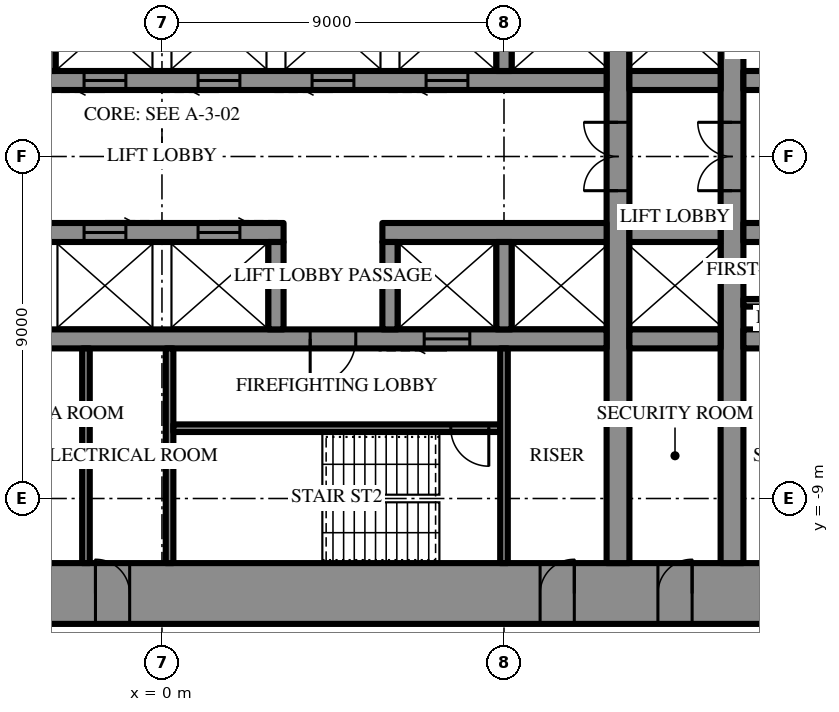
"""IFC4 building model, lengths in metres.
Left out: names, types, materials, properties, quantities, classifications, styles, units other than length and angle.
Written with IfcOpenShell. Run it as: python <this file> out.ifc"""

import sys

from ifc_helpers import new_model, si_unit, direction, frame, frame_2d, origin, place, context, subcontext, project, spatial, rectangle, extrude, element, fill, save


model = new_model("IFC4")
c1 = context("Model", 3, precision=1e-05, world=origin(), true_north=direction((0.0, 1.0)))
c2 = subcontext(c1, "Body", "Model", "MODEL_VIEW")
j1 = project(units=[si_unit("LENGTHUNIT", "METRE"), si_unit("PLANEANGLEUNIT", "RADIAN")], contexts=[c1])
p1 = place(None, origin())
s1 = spatial("IfcSite", under=j1, at=p1, CompositionType="ELEMENT")
p2 = place(p1, origin())
s2 = spatial("IfcBuilding", under=s1, at=p2, CompositionType="ELEMENT")
p3 = place(p2, frame((0.0, 0.0, 127.9)))
s3 = spatial("IfcBuildingStorey", under=s2, at=p3, CompositionType="ELEMENT", Elevation=127.9)
p4 = place(p3, frame((18.6, -11.5, 0.0), z_axis=(0.0, 0.0, 1.0), x_axis=(-1.0, 0.0, 0.0)))
e1 = element("IfcWall", 1, at=p4, inside=s3, PredefinedType="SHEAR", context=c2, shape_type="SweptSolid", body=[
    extrude(rectangle(XDim=37.2, YDim=1.6, at=frame_2d((18.6, 0.0))), origin(), (0.0, 0.0, 1.0), 4.2),
])
p5 = place(p4, frame((19.45, 0.0, 0.0)))
e2 = element("IfcOpeningElement", 2, at=p5, cuts=e1, PredefinedType="OPENING", context=c2, shape_type="SweptSolid", body=[
    extrude(rectangle(XDim=0.9, YDim=2.2, at=frame_2d((0.45, 1.1))), frame((0.0, 0.81, 0.0), z_axis=(0.0, -1.0, 0.0), x_axis=(1.0, 0.0, 0.0)), (0.0, 0.0, 1.0), 1.62),
])
p6 = place(p4, frame((22.45, 0.0, 0.0)))
e3 = element("IfcOpeningElement", 3, at=p6, cuts=e1, PredefinedType="OPENING", context=c2, shape_type="SweptSolid", body=[
    extrude(rectangle(XDim=0.9, YDim=2.2, at=frame_2d((0.45, 1.1))), frame((0.0, 0.81, 0.0), z_axis=(0.0, -1.0, 0.0), x_axis=(1.0, 0.0, 0.0)), (0.0, 0.0, 1.0), 1.62),
])
p7 = place(p4, frame((25.5, 0.0, 0.0)))
e4 = element("IfcOpeningElement", 4, at=p7, cuts=e1, PredefinedType="OPENING", context=c2, shape_type="SweptSolid", body=[
    extrude(rectangle(XDim=1.0, YDim=2.2, at=frame_2d((0.5, 1.1))), frame((0.0, 0.81, 0.0), z_axis=(0.0, -1.0, 0.0), x_axis=(1.0, 0.0, 0.0)), (0.0, 0.0, 1.0), 1.62),
])
p8 = place(p4, frame((1.8, 0.0, 0.0)))
e5 = element("IfcOpeningElement", 5, at=p8, cuts=e1, PredefinedType="OPENING", context=c2, shape_type="SweptSolid", body=[
    extrude(rectangle(XDim=0.9, YDim=2.2, at=frame_2d((0.45, 1.1))), frame((0.0, 0.81, 0.0), z_axis=(0.0, -1.0, 0.0), x_axis=(1.0, 0.0, 0.0)), (0.0, 0.0, 1.0), 1.62),
])
p9 = place(p4, frame((4.65, 0.0, 0.0)))
e6 = element("IfcOpeningElement", 6, at=p9, cuts=e1, PredefinedType="OPENING", context=c2, shape_type="SweptSolid", body=[
    extrude(rectangle(XDim=0.9, YDim=2.2, at=frame_2d((0.45, 1.1))), frame((0.0, 0.81, 0.0), z_axis=(0.0, -1.0, 0.0), x_axis=(1.0, 0.0, 0.0)), (0.0, 0.0, 1.0), 1.62),
])
p10 = place(p4, frame((7.75, 0.0, 0.0)))
e7 = element("IfcOpeningElement", 7, at=p10, cuts=e1, PredefinedType="OPENING", context=c2, shape_type="SweptSolid", body=[
    extrude(rectangle(XDim=0.9, YDim=2.2, at=frame_2d((0.45, 1.1))), frame((0.0, 0.81, 0.0), z_axis=(0.0, -1.0, 0.0), x_axis=(1.0, 0.0, 0.0)), (0.0, 0.0, 1.0), 1.62),
])
p11 = place(p4, frame((28.55, 0.0, 0.0)))
e8 = element("IfcOpeningElement", 8, at=p11, cuts=e1, PredefinedType="OPENING", context=c2, shape_type="SweptSolid", body=[
    extrude(rectangle(XDim=0.9, YDim=2.2, at=frame_2d((0.45, 1.1))), frame((0.0, 0.81, 0.0), z_axis=(0.0, -1.0, 0.0), x_axis=(1.0, 0.0, 0.0)), (0.0, 0.0, 1.0), 1.62),
])
p12 = place(p4, frame((31.65, 0.0, 0.0)))
e9 = element("IfcOpeningElement", 9, at=p12, cuts=e1, PredefinedType="OPENING", context=c2, shape_type="SweptSolid", body=[
    extrude(rectangle(XDim=0.9, YDim=2.2, at=frame_2d((0.45, 1.1))), frame((0.0, 0.81, 0.0), z_axis=(0.0, -1.0, 0.0), x_axis=(1.0, 0.0, 0.0)), (0.0, 0.0, 1.0), 1.62),
])
p13 = place(p4, frame((34.5, 0.0, 0.0)))
e10 = element("IfcOpeningElement", 10, at=p13, cuts=e1, PredefinedType="OPENING", context=c2, shape_type="SweptSolid", body=[
    extrude(rectangle(XDim=0.9, YDim=2.2, at=frame_2d((0.45, 1.1))), frame((0.0, 0.81, 0.0), z_axis=(0.0, -1.0, 0.0), x_axis=(1.0, 0.0, 0.0)), (0.0, 0.0, 1.0), 1.62),
])
p14 = place(p3, frame((12.0, -10.7, 0.0), z_axis=(0.0, 0.0, 1.0), x_axis=(0.0, 1.0, 0.0)))
e11 = element("IfcWall", 11, at=p14, inside=s3, PredefinedType="SHEAR", context=c2, shape_type="SweptSolid", body=[
    extrude(rectangle(XDim=21.4, YDim=0.6, at=frame_2d((10.7, 0.0))), origin(), (0.0, 0.0, 1.0), 4.2),
])
p15 = place(p14, frame((9.8, 0.0, 0.0)))
e12 = element("IfcOpeningElement", 12, at=p15, cuts=e11, PredefinedType="OPENING", context=c2, shape_type="SweptSolid", body=[
    extrude(rectangle(XDim=1.8, YDim=2.4, at=frame_2d((0.9, 1.2))), frame((0.0, 0.31, 0.0), z_axis=(0.0, -1.0, 0.0), x_axis=(1.0, 0.0, 0.0)), (0.0, 0.0, 1.0), 0.62),
])
p16 = place(p3, frame((15.0, -10.7, 0.0), z_axis=(0.0, 0.0, 1.0), x_axis=(0.0, 1.0, 0.0)))
e13 = element("IfcWall", 13, at=p16, inside=s3, PredefinedType="SHEAR", context=c2, shape_type="SweptSolid", body=[
    extrude(rectangle(XDim=21.4, YDim=0.6, at=frame_2d((10.7, 0.0))), origin(), (0.0, 0.0, 1.0), 4.2),
])
p17 = place(p16, frame((9.8, 0.0, 0.0)))
e14 = element("IfcOpeningElement", 14, at=p17, cuts=e13, PredefinedType="OPENING", context=c2, shape_type="SweptSolid", body=[
    extrude(rectangle(XDim=1.8, YDim=2.4, at=frame_2d((0.9, 1.2))), frame((0.0, 0.31, 0.0), z_axis=(0.0, -1.0, 0.0), x_axis=(1.0, 0.0, 0.0)), (0.0, 0.0, 1.0), 0.62),
])
p18 = place(p3, frame((-3.2, 2.0, 0.0), z_axis=(0.0, 0.0, 1.0), x_axis=(1.0, 0.0, 0.0)))
e15 = element("IfcWall", 15, at=p18, inside=s3, PredefinedType="SHEAR", context=c2, shape_type="SweptSolid", body=[
    extrude(rectangle(XDim=14.9, YDim=0.5, at=frame_2d((7.45, 0.0))), origin(), (0.0, 0.0, 1.0), 4.2),
])
p19 = place(p18, frame((1.15, 0.0, 0.0)))
e16 = element("IfcOpeningElement", 16, at=p19, cuts=e15, PredefinedType="OPENING", context=c2, shape_type="SweptSolid", body=[
    extrude(rectangle(XDim=1.1, YDim=2.2, at=frame_2d((0.55, 1.1))), frame((0.0, 0.26, 0.0), z_axis=(0.0, -1.0, 0.0), x_axis=(1.0, 0.0, 0.0)), (0.0, 0.0, 1.0), 0.52),
])
p20 = place(p18, frame((4.15, 0.0, 0.0)))
e17 = element("IfcOpeningElement", 17, at=p20, cuts=e15, PredefinedType="OPENING", context=c2, shape_type="SweptSolid", body=[
    extrude(rectangle(XDim=1.1, YDim=2.2, at=frame_2d((0.55, 1.1))), frame((0.0, 0.26, 0.0), z_axis=(0.0, -1.0, 0.0), x_axis=(1.0, 0.0, 0.0)), (0.0, 0.0, 1.0), 0.52),
])
p21 = place(p18, frame((7.15, 0.0, 0.0)))
e18 = element("IfcOpeningElement", 18, at=p21, cuts=e15, PredefinedType="OPENING", context=c2, shape_type="SweptSolid", body=[
    extrude(rectangle(XDim=1.1, YDim=2.2, at=frame_2d((0.55, 1.1))), frame((0.0, 0.26, 0.0), z_axis=(0.0, -1.0, 0.0), x_axis=(1.0, 0.0, 0.0)), (0.0, 0.0, 1.0), 0.52),
])
p22 = place(p18, frame((10.15, 0.0, 0.0)))
e19 = element("IfcOpeningElement", 19, at=p22, cuts=e15, PredefinedType="OPENING", context=c2, shape_type="SweptSolid", body=[
    extrude(rectangle(XDim=1.1, YDim=2.2, at=frame_2d((0.55, 1.1))), frame((0.0, 0.26, 0.0), z_axis=(0.0, -1.0, 0.0), x_axis=(1.0, 0.0, 0.0)), (0.0, 0.0, 1.0), 0.52),
])
p23 = place(p3, frame((12.3, 2.0, 0.0), z_axis=(0.0, 0.0, 1.0), x_axis=(1.0, 0.0, 0.0)))
e20 = element("IfcWall", 20, at=p23, inside=s3, PredefinedType="SHEAR", context=c2, shape_type="SweptSolid", body=[
    extrude(rectangle(XDim=2.4, YDim=0.5, at=frame_2d((1.2, 0.0))), origin(), (0.0, 0.0, 1.0), 4.2),
])
p24 = place(p3, frame((15.3, 2.0, 0.0), z_axis=(0.0, 0.0, 1.0), x_axis=(1.0, 0.0, 0.0)))
e21 = element("IfcWall", 21, at=p24, inside=s3, PredefinedType="SHEAR", context=c2, shape_type="SweptSolid", body=[
    extrude(rectangle(XDim=2.1, YDim=0.5, at=frame_2d((1.05, 0.0))), origin(), (0.0, 0.0, 1.0), 4.2),
])
p25 = place(p24, frame((0.6, 0.0, 0.0)))
e22 = element("IfcOpeningElement", 22, at=p25, cuts=e21, PredefinedType="OPENING", context=c2, shape_type="SweptSolid", body=[
    extrude(rectangle(XDim=0.9, YDim=2.2, at=frame_2d((0.45, 1.1))), frame((0.0, 0.26, 0.0), z_axis=(0.0, -1.0, 0.0), x_axis=(1.0, 0.0, 0.0)), (0.0, 0.0, 1.0), 0.52),
])
for number, where, z_axis, x_axis in (
    (23, (-3.0, 2.25, 0.0), (0.0, 0.0, 1.0), (0.0, 1.0, 0.0)),
    (24, (9.0, 2.25, 0.0), (0.0, 0.0, 1.0), (0.0, 1.0, 0.0)),
):
    element("IfcWall", number, at=place(p3, frame(where, z_axis=z_axis, x_axis=x_axis)), inside=s3, PredefinedType="SHEAR", context=c2, shape_type="SweptSolid", body=[
        extrude(rectangle(XDim=2.3, YDim=0.4, at=frame_2d((1.15, 0.0))), origin(), (0.0, 0.0, 1.0), 4.2),
    ])
p26 = place(p3, frame((17.4, -2.0, 0.0), z_axis=(0.0, 0.0, 1.0), x_axis=(-1.0, 0.0, 0.0)))
e25 = element("IfcWall", 25, at=p26, inside=s3, PredefinedType="SHEAR", context=c2, shape_type="SweptSolid", body=[
    extrude(rectangle(XDim=2.1, YDim=0.5, at=frame_2d((1.05, 0.0))), origin(), (0.0, 0.0, 1.0), 4.2),
])
p27 = place(p26, frame((0.6, 0.0, 0.0)))
e26 = element("IfcOpeningElement", 26, at=p27, cuts=e25, PredefinedType="OPENING", context=c2, shape_type="SweptSolid", body=[
    extrude(rectangle(XDim=0.9, YDim=2.2, at=frame_2d((0.45, 1.1))), frame((0.0, 0.26, 0.0), z_axis=(0.0, -1.0, 0.0), x_axis=(1.0, 0.0, 0.0)), (0.0, 0.0, 1.0), 0.52),
])
p28 = place(p3, frame((14.7, -2.0, 0.0), z_axis=(0.0, 0.0, 1.0), x_axis=(-1.0, 0.0, 0.0)))
e27 = element("IfcWall", 27, at=p28, inside=s3, PredefinedType="SHEAR", context=c2, shape_type="SweptSolid", body=[
    extrude(rectangle(XDim=2.4, YDim=0.5, at=frame_2d((1.2, 0.0))), origin(), (0.0, 0.0, 1.0), 4.2),
])
p29 = place(p3, frame((11.7, -2.0, 0.0), z_axis=(0.0, 0.0, 1.0), x_axis=(-1.0, 0.0, 0.0)))
e28 = element("IfcWall", 28, at=p29, inside=s3, PredefinedType="SHEAR", context=c2, shape_type="SweptSolid", body=[
    extrude(rectangle(XDim=5.9, YDim=0.5, at=frame_2d((2.95, 0.0))), origin(), (0.0, 0.0, 1.0), 4.2),
])
p30 = place(p3, frame((3.2, -2.0, 0.0), z_axis=(0.0, 0.0, 1.0), x_axis=(-1.0, 0.0, 0.0)))
e29 = element("IfcWall", 29, at=p30, inside=s3, PredefinedType="SHEAR", context=c2, shape_type="SweptSolid", body=[
    extrude(rectangle(XDim=14.9, YDim=0.5, at=frame_2d((7.45, 0.0))), origin(), (0.0, 0.0, 1.0), 4.2),
])
p31 = place(p30, frame((1.15, 0.0, 0.0)))
e30 = element("IfcOpeningElement", 30, at=p31, cuts=e29, PredefinedType="OPENING", context=c2, shape_type="SweptSolid", body=[
    extrude(rectangle(XDim=1.1, YDim=2.2, at=frame_2d((0.55, 1.1))), frame((0.0, 0.26, 0.0), z_axis=(0.0, -1.0, 0.0), x_axis=(1.0, 0.0, 0.0)), (0.0, 0.0, 1.0), 0.52),
])
p32 = place(p30, frame((4.15, 0.0, 0.0)))
e31 = element("IfcOpeningElement", 31, at=p32, cuts=e29, PredefinedType="OPENING", context=c2, shape_type="SweptSolid", body=[
    extrude(rectangle(XDim=1.1, YDim=2.2, at=frame_2d((0.55, 1.1))), frame((0.0, 0.26, 0.0), z_axis=(0.0, -1.0, 0.0), x_axis=(1.0, 0.0, 0.0)), (0.0, 0.0, 1.0), 0.52),
])
p33 = place(p30, frame((7.15, 0.0, 0.0)))
e32 = element("IfcOpeningElement", 32, at=p33, cuts=e29, PredefinedType="OPENING", context=c2, shape_type="SweptSolid", body=[
    extrude(rectangle(XDim=1.1, YDim=2.2, at=frame_2d((0.55, 1.1))), frame((0.0, 0.26, 0.0), z_axis=(0.0, -1.0, 0.0), x_axis=(1.0, 0.0, 0.0)), (0.0, 0.0, 1.0), 0.52),
])
p34 = place(p30, frame((10.15, 0.0, 0.0)))
e33 = element("IfcOpeningElement", 33, at=p34, cuts=e29, PredefinedType="OPENING", context=c2, shape_type="SweptSolid", body=[
    extrude(rectangle(XDim=1.1, YDim=2.2, at=frame_2d((0.55, 1.1))), frame((0.0, 0.26, 0.0), z_axis=(0.0, -1.0, 0.0), x_axis=(1.0, 0.0, 0.0)), (0.0, 0.0, 1.0), 0.52),
])
p35 = place(p3, frame((17.4, -4.8, 0.0), z_axis=(0.0, 0.0, 1.0), x_axis=(-1.0, 0.0, 0.0)))
e34 = element("IfcWall", 34, at=p35, inside=s3, PredefinedType="SHEAR", context=c2, shape_type="SweptSolid", body=[
    extrude(rectangle(XDim=2.1, YDim=0.5, at=frame_2d((1.05, 0.0))), origin(), (0.0, 0.0, 1.0), 4.2),
])
p36 = place(p3, frame((14.7, -4.8, 0.0), z_axis=(0.0, 0.0, 1.0), x_axis=(-1.0, 0.0, 0.0)))
e35 = element("IfcWall", 35, at=p36, inside=s3, PredefinedType="SHEAR", context=c2, shape_type="SweptSolid", body=[
    extrude(rectangle(XDim=2.4, YDim=0.5, at=frame_2d((1.2, 0.0))), origin(), (0.0, 0.0, 1.0), 4.2),
])
p37 = place(p3, frame((11.7, -4.8, 0.0), z_axis=(0.0, 0.0, 1.0), x_axis=(-1.0, 0.0, 0.0)))
e36 = element("IfcWall", 36, at=p37, inside=s3, PredefinedType="SHEAR", context=c2, shape_type="SweptSolid", body=[
    extrude(rectangle(XDim=23.4, YDim=0.5, at=frame_2d((11.7, 0.0))), origin(), (0.0, 0.0, 1.0), 4.2),
])
p38 = place(p37, frame((6.6, 0.0, 0.0)))
e37 = element("IfcOpeningElement", 37, at=p38, cuts=e36, PredefinedType="OPENING", context=c2, shape_type="SweptSolid", body=[
    extrude(rectangle(XDim=1.2, YDim=2.2, at=frame_2d((0.6, 1.1))), frame((0.0, 0.26, 0.0), z_axis=(0.0, -1.0, 0.0), x_axis=(1.0, 0.0, 0.0)), (0.0, 0.0, 1.0), 0.52),
])
p39 = place(p37, frame((3.6, 0.0, 0.0)))
e38 = element("IfcOpeningElement", 38, at=p39, cuts=e36, PredefinedType="OPENING", context=c2, shape_type="SweptSolid", body=[
    extrude(rectangle(XDim=1.2, YDim=2.2, at=frame_2d((0.6, 1.1))), frame((0.0, 0.26, 0.0), z_axis=(0.0, -1.0, 0.0), x_axis=(1.0, 0.0, 0.0)), (0.0, 0.0, 1.0), 0.52),
])
for number, where, z_axis, x_axis in (
    (39, (9.0, -2.25, 0.0), (0.0, 0.0, 1.0), (0.0, -1.0, 0.0)),
    (40, (6.0, -2.25, 0.0), (0.0, 0.0, 1.0), (0.0, -1.0, 0.0)),
    (41, (3.0, -2.25, 0.0), (0.0, 0.0, 1.0), (0.0, -1.0, 0.0)),
):
    element("IfcWall", number, at=place(p3, frame(where, z_axis=z_axis, x_axis=x_axis)), inside=s3, PredefinedType="SHEAR", context=c2, shape_type="SweptSolid", body=[
        extrude(rectangle(XDim=2.3, YDim=0.4, at=frame_2d((1.15, 0.0))), origin(), (0.0, 0.0, 1.0), 4.2),
    ])
p40 = place(p3, frame((0.2, -5.05, 0.0), z_axis=(0.0, 0.0, 1.0), x_axis=(0.0, -1.0, 0.0)))
e42 = element("IfcWall", 42, at=p40, inside=s3, PredefinedType="SHEAR", context=c2, shape_type="SweptSolid", body=[
    extrude(rectangle(XDim=5.65, YDim=0.2, at=frame_2d((2.825, 0.0))), origin(), (0.0, 0.0, 1.0), 4.2),
])
p41 = place(p3, frame((8.9, -7.15, 0.0), z_axis=(0.0, 0.0, 1.0), x_axis=(-1.0, 0.0, 0.0)))
e43 = element("IfcWall", 43, at=p41, inside=s3, PredefinedType="SHEAR", context=c2, shape_type="SweptSolid", body=[
    extrude(rectangle(XDim=8.6, YDim=0.2, at=frame_2d((4.3, 0.0))), origin(), (0.0, 0.0, 1.0), 4.2),
])
p42 = place(p41, frame((0.3, 0.0, 0.0)))
e44 = element("IfcOpeningElement", 44, at=p42, cuts=e43, PredefinedType="OPENING", context=c2, shape_type="SweptSolid", body=[
    extrude(rectangle(XDim=1.0, YDim=2.2, at=frame_2d((0.5, 1.1))), frame((0.0, 0.11, 0.0), z_axis=(0.0, -1.0, 0.0), x_axis=(1.0, 0.0, 0.0)), (0.0, 0.0, 1.0), 0.22),
])
for number, where, z_axis, x_axis in (
    (45, (9.0, -5.05, 0.0), (0.0, 0.0, 1.0), (0.0, -1.0, 0.0)),
    (46, (-2.0, -5.05, 0.0), (0.0, 0.0, 1.0), (0.0, -1.0, 0.0)),
):
    element("IfcWall", number, at=place(p3, frame(where, z_axis=z_axis, x_axis=x_axis)), inside=s3, PredefinedType="PARTITIONING", context=c2, shape_type="SweptSolid", body=[
        extrude(rectangle(XDim=5.65, YDim=0.2, at=frame_2d((2.825, 0.0))), origin(), (0.0, 0.0, 1.0), 4.0),
    ])
p43 = place(p3, frame((17.4, -3.85, 0.0), z_axis=(0.0, 0.0, 1.0), x_axis=(-1.0, 0.0, 0.0)))
e47 = element("IfcWall", 47, at=p43, inside=s3, PredefinedType="PARTITIONING", context=c2, shape_type="SweptSolid", body=[
    extrude(rectangle(XDim=2.1, YDim=0.2, at=frame_2d((1.05, 0.0))), origin(), (0.0, 0.0, 1.0), 4.0),
])
p44 = place(p38, origin())
e48 = element("IfcDoor", 48, at=p44, inside=s3, OperationType="SINGLE_SWING_LEFT", PredefinedType="DOOR", context=c2, shape_type="SweptSolid", body=[
    extrude(rectangle(XDim=1.2, YDim=2.2, at=frame_2d((0.6, 1.1))), frame((0.0, 0.025, 0.0), z_axis=(0.0, -1.0, 0.0), x_axis=(1.0, 0.0, 0.0)), (0.0, 0.0, 1.0), 0.05),
])
fill(e37, e48)
p45 = place(p42, origin())
e49 = element("IfcDoor", 49, at=p45, inside=s3, OperationType="SINGLE_SWING_RIGHT", PredefinedType="DOOR", context=c2, shape_type="SweptSolid", body=[
    extrude(rectangle(XDim=1.0, YDim=2.2, at=frame_2d((0.5, 1.1))), frame((0.0, 0.025, 0.0), z_axis=(0.0, -1.0, 0.0), x_axis=(1.0, 0.0, 0.0)), (0.0, 0.0, 1.0), 0.05),
])
fill(e44, e49)
p46 = place(p5, frame((0.9, 0.0, 0.0), z_axis=(0.0, 0.0, 1.0), x_axis=(-1.0, 0.0, 0.0)))
e50 = element("IfcDoor", 50, at=p46, inside=s3, OperationType="SINGLE_SWING_RIGHT", PredefinedType="DOOR", context=c2, shape_type="SweptSolid", body=[
    extrude(rectangle(XDim=0.9, YDim=2.2, at=frame_2d((0.45, 1.1))), frame((0.0, 0.025, 0.0), z_axis=(0.0, -1.0, 0.0), x_axis=(1.0, 0.0, 0.0)), (0.0, 0.0, 1.0), 0.05),
])
fill(e2, e50)
p47 = place(p9, frame((0.9, 0.0, 0.0), z_axis=(0.0, 0.0, 1.0), x_axis=(-1.0, 0.0, 0.0)))
e51 = element("IfcDoor", 51, at=p47, inside=s3, OperationType="SINGLE_SWING_LEFT", PredefinedType="DOOR", context=c2, shape_type="SweptSolid", body=[
    extrude(rectangle(XDim=0.9, YDim=2.2, at=frame_2d((0.45, 1.1))), frame((0.0, 0.025, 0.0), z_axis=(0.0, -1.0, 0.0), x_axis=(1.0, 0.0, 0.0)), (0.0, 0.0, 1.0), 0.05),
])
fill(e6, e51)
p48 = place(p10, frame((0.9, 0.0, 0.0), z_axis=(0.0, 0.0, 1.0), x_axis=(-1.0, 0.0, 0.0)))
e52 = element("IfcDoor", 52, at=p48, inside=s3, OperationType="SINGLE_SWING_LEFT", PredefinedType="DOOR", context=c2, shape_type="SweptSolid", body=[
    extrude(rectangle(XDim=0.9, YDim=2.2, at=frame_2d((0.45, 1.1))), frame((0.0, 0.025, 0.0), z_axis=(0.0, -1.0, 0.0), x_axis=(1.0, 0.0, 0.0)), (0.0, 0.0, 1.0), 0.05),
])
fill(e7, e52)
p49 = place(p15, origin())
e53 = element("IfcDoor", 53, at=p49, inside=s3, OperationType="DOUBLE_DOOR_SINGLE_SWING", PredefinedType="DOOR", context=c2, shape_type="SweptSolid", body=[
    extrude(rectangle(XDim=1.8, YDim=2.4, at=frame_2d((0.9, 1.2))), frame((0.0, 0.025, 0.0), z_axis=(0.0, -1.0, 0.0), x_axis=(1.0, 0.0, 0.0)), (0.0, 0.0, 1.0), 0.05),
])
fill(e12, e53)
p50 = place(p17, origin())
e54 = element("IfcDoor", 54, at=p50, inside=s3, OperationType="DOUBLE_DOOR_SINGLE_SWING", PredefinedType="DOOR", context=c2, shape_type="SweptSolid", body=[
    extrude(rectangle(XDim=1.8, YDim=2.4, at=frame_2d((0.9, 1.2))), frame((0.0, 0.025, 0.0), z_axis=(0.0, -1.0, 0.0), x_axis=(1.0, 0.0, 0.0)), (0.0, 0.0, 1.0), 0.05),
])
fill(e14, e54)
p51 = place(p19, frame((1.1, 0.0, 0.0), z_axis=(0.0, 0.0, 1.0), x_axis=(-1.0, 0.0, 0.0)))
e55 = element("IfcDoor", 55, at=p51, inside=s3, OperationType="SLIDING_TO_LEFT", PredefinedType="DOOR", context=c2, shape_type="SweptSolid", body=[
    extrude(rectangle(XDim=1.1, YDim=2.2, at=frame_2d((0.55, 1.1))), frame((0.0, 0.025, 0.0), z_axis=(0.0, -1.0, 0.0), x_axis=(1.0, 0.0, 0.0)), (0.0, 0.0, 1.0), 0.05),
])
fill(e16, e55)
p52 = place(p20, frame((1.1, 0.0, 0.0), z_axis=(0.0, 0.0, 1.0), x_axis=(-1.0, 0.0, 0.0)))
e56 = element("IfcDoor", 56, at=p52, inside=s3, OperationType="SLIDING_TO_LEFT", PredefinedType="DOOR", context=c2, shape_type="SweptSolid", body=[
    extrude(rectangle(XDim=1.1, YDim=2.2, at=frame_2d((0.55, 1.1))), frame((0.0, 0.025, 0.0), z_axis=(0.0, -1.0, 0.0), x_axis=(1.0, 0.0, 0.0)), (0.0, 0.0, 1.0), 0.05),
])
fill(e17, e56)
p53 = place(p21, frame((1.1, 0.0, 0.0), z_axis=(0.0, 0.0, 1.0), x_axis=(-1.0, 0.0, 0.0)))
e57 = element("IfcDoor", 57, at=p53, inside=s3, OperationType="SLIDING_TO_LEFT", PredefinedType="DOOR", context=c2, shape_type="SweptSolid", body=[
    extrude(rectangle(XDim=1.1, YDim=2.2, at=frame_2d((0.55, 1.1))), frame((0.0, 0.025, 0.0), z_axis=(0.0, -1.0, 0.0), x_axis=(1.0, 0.0, 0.0)), (0.0, 0.0, 1.0), 0.05),
])
fill(e18, e57)
p54 = place(p22, frame((1.1, 0.0, 0.0), z_axis=(0.0, 0.0, 1.0), x_axis=(-1.0, 0.0, 0.0)))
e58 = element("IfcDoor", 58, at=p54, inside=s3, OperationType="SLIDING_TO_LEFT", PredefinedType="DOOR", context=c2, shape_type="SweptSolid", body=[
    extrude(rectangle(XDim=1.1, YDim=2.2, at=frame_2d((0.55, 1.1))), frame((0.0, 0.025, 0.0), z_axis=(0.0, -1.0, 0.0), x_axis=(1.0, 0.0, 0.0)), (0.0, 0.0, 1.0), 0.05),
])
fill(e19, e58)
p55 = place(p39, origin())
e59 = element("IfcDoor", 59, at=p55, inside=s3, OperationType="SLIDING_TO_LEFT", PredefinedType="DOOR", context=c2, shape_type="SweptSolid", body=[
    extrude(rectangle(XDim=1.2, YDim=2.2, at=frame_2d((0.6, 1.1))), frame((0.0, 0.025, 0.0), z_axis=(0.0, -1.0, 0.0), x_axis=(1.0, 0.0, 0.0)), (0.0, 0.0, 1.0), 0.05),
])
fill(e38, e59)
p56 = place(p31, frame((1.1, 0.0, 0.0), z_axis=(0.0, 0.0, 1.0), x_axis=(-1.0, 0.0, 0.0)))
e60 = element("IfcDoor", 60, at=p56, inside=s3, OperationType="SLIDING_TO_LEFT", PredefinedType="DOOR", context=c2, shape_type="SweptSolid", body=[
    extrude(rectangle(XDim=1.1, YDim=2.2, at=frame_2d((0.55, 1.1))), frame((0.0, 0.025, 0.0), z_axis=(0.0, -1.0, 0.0), x_axis=(1.0, 0.0, 0.0)), (0.0, 0.0, 1.0), 0.05),
])
fill(e30, e60)
p57 = place(p32, frame((1.1, 0.0, 0.0), z_axis=(0.0, 0.0, 1.0), x_axis=(-1.0, 0.0, 0.0)))
e61 = element("IfcDoor", 61, at=p57, inside=s3, OperationType="SLIDING_TO_LEFT", PredefinedType="DOOR", context=c2, shape_type="SweptSolid", body=[
    extrude(rectangle(XDim=1.1, YDim=2.2, at=frame_2d((0.55, 1.1))), frame((0.0, 0.025, 0.0), z_axis=(0.0, -1.0, 0.0), x_axis=(1.0, 0.0, 0.0)), (0.0, 0.0, 1.0), 0.05),
])
fill(e31, e61)
save(model, sys.argv[1])
